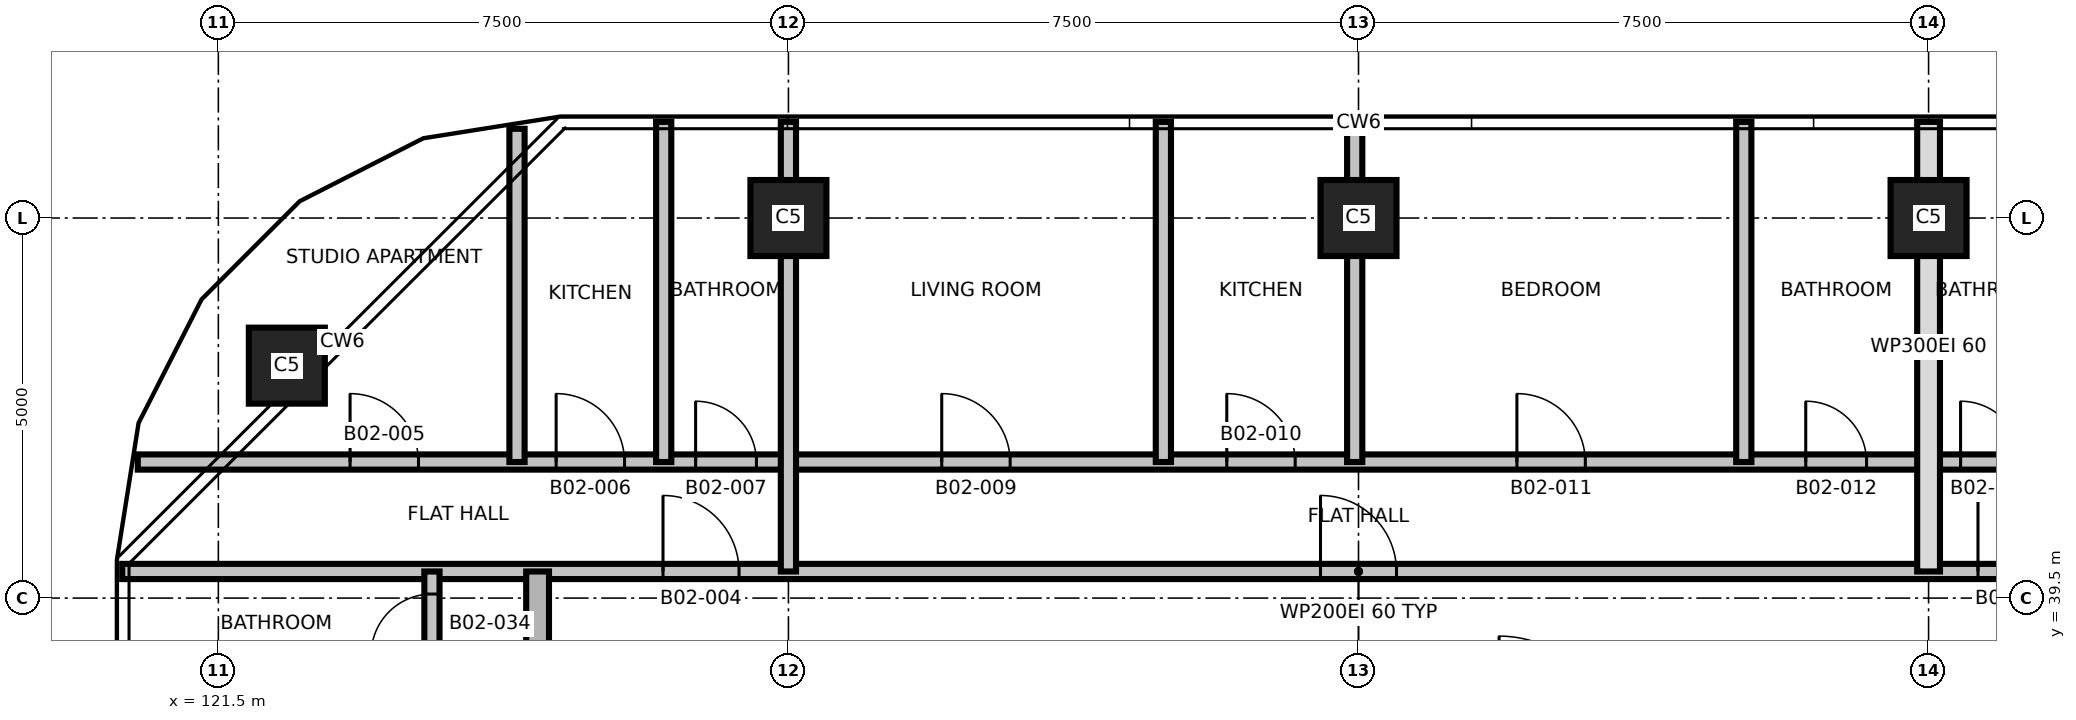
"""IFC4 building model, lengths in metres.
Left out: names, types, materials, properties, quantities, classifications, styles, units other than length and angle.
Written with IfcOpenShell. Run it as: python <this file> out.ifc"""

import sys

from ifc_helpers import new_model, si_unit, direction, frame, frame_2d, origin, origin_2d, place, context, subcontext, project, spatial, rectangle, extrude, element, fill, save


model = new_model("IFC4")
c1 = context("Model", 3, precision=1e-05, world=origin(), true_north=direction((0.0, 1.0)))
c2 = subcontext(c1, "Body", "Model", "MODEL_VIEW")
j1 = project(units=[si_unit("LENGTHUNIT", "METRE"), si_unit("PLANEANGLEUNIT", "RADIAN")], contexts=[c1])
p1 = place(None, origin())
s1 = spatial("IfcSite", under=j1, at=p1, CompositionType="ELEMENT")
p2 = place(p1, origin())
s2 = spatial("IfcBuilding", under=s1, at=p2, CompositionType="ELEMENT")
p3 = place(p2, frame((0.0, 0.0, 44.6)))
s3 = spatial("IfcBuildingStorey", under=s2, at=p3, CompositionType="ELEMENT", Elevation=44.6)
for number, where, z_axis, x_axis in (
    (1, (122.401, 42.558, 0.0), (0.0, 0.0, 1.0), (1.0, 0.0, 0.0)),
    (2, (129.0, 44.5, 0.0), (0.0, 0.0, 1.0), (1.0, 0.0, 0.0)),
    (3, (136.5, 44.5, 0.0), (0.0, 0.0, 1.0), (1.0, 0.0, 0.0)),
    (4, (144.0, 44.5, 0.0), (0.0, 0.0, 1.0), (1.0, 0.0, 0.0)),
):
    element("IfcColumn", number, at=place(p3, frame(where, z_axis=z_axis, x_axis=x_axis)), inside=s3, PredefinedType="COLUMN", context=c2, shape_type="SweptSolid", body=[
        extrude(rectangle(XDim=1.0, YDim=1.0, at=origin_2d()), origin(), (0.0, 0.0, 1.0), 3.7),
    ])
p4 = place(p3, frame((120.235, 39.85, 0.0), z_axis=(0.0, 0.0, 1.0), x_axis=(1.0, 0.0, 0.0)))
e5 = element("IfcWall", 5, at=p4, inside=s3, PredefinedType="PARTITIONING", context=c2, shape_type="SweptSolid", body=[
    extrude(rectangle(XDim=32.53, YDim=0.2, at=frame_2d((16.265, 0.0))), origin(), (0.0, 0.0, 1.0), 3.4),
])
p5 = place(p4, frame((7.115, 0.0, 0.0)))
e6 = element("IfcOpeningElement", 6, at=p5, cuts=e5, PredefinedType="OPENING", context=c2, shape_type="SweptSolid", body=[
    extrude(rectangle(XDim=1.0, YDim=2.1, at=frame_2d((0.5, 1.05))), frame((0.0, 0.11, 0.0), z_axis=(0.0, -1.0, 0.0), x_axis=(1.0, 0.0, 0.0)), (0.0, 0.0, 1.0), 0.22),
])
p6 = place(p4, frame((15.765, 0.0, 0.0)))
e7 = element("IfcOpeningElement", 7, at=p6, cuts=e5, PredefinedType="OPENING", context=c2, shape_type="SweptSolid", body=[
    extrude(rectangle(XDim=1.0, YDim=2.1, at=frame_2d((0.5, 1.05))), frame((0.0, 0.11, 0.0), z_axis=(0.0, -1.0, 0.0), x_axis=(1.0, 0.0, 0.0)), (0.0, 0.0, 1.0), 0.22),
])
p7 = place(p4, frame((24.415, 0.0, 0.0)))
e8 = element("IfcOpeningElement", 8, at=p7, cuts=e5, PredefinedType="OPENING", context=c2, shape_type="SweptSolid", body=[
    extrude(rectangle(XDim=1.0, YDim=2.1, at=frame_2d((0.5, 1.05))), frame((0.0, 0.11, 0.0), z_axis=(0.0, -1.0, 0.0), x_axis=(1.0, 0.0, 0.0)), (0.0, 0.0, 1.0), 0.22),
])
p8 = place(p3, frame((120.44, 41.29, 0.0), z_axis=(0.0, 0.0, 1.0), x_axis=(1.0, 0.0, 0.0)))
e9 = element("IfcWall", 9, at=p8, inside=s3, PredefinedType="PARTITIONING", context=c2, shape_type="SweptSolid", body=[
    extrude(rectangle(XDim=32.12, YDim=0.2, at=frame_2d((16.06, 0.0))), origin(), (0.0, 0.0, 1.0), 3.4),
])
p9 = place(p8, frame((2.793, 0.0, 0.0)))
e10 = element("IfcOpeningElement", 10, at=p9, cuts=e9, PredefinedType="OPENING", context=c2, shape_type="SweptSolid", body=[
    extrude(rectangle(XDim=0.9, YDim=2.1, at=frame_2d((0.45, 1.05))), frame((0.0, 0.11, 0.0), z_axis=(0.0, -1.0, 0.0), x_axis=(1.0, 0.0, 0.0)), (0.0, 0.0, 1.0), 0.22),
])
p10 = place(p8, frame((5.504, 0.0, 0.0)))
e11 = element("IfcOpeningElement", 11, at=p10, cuts=e9, PredefinedType="OPENING", context=c2, shape_type="SweptSolid", body=[
    extrude(rectangle(XDim=0.9, YDim=2.1, at=frame_2d((0.45, 1.05))), frame((0.0, 0.11, 0.0), z_axis=(0.0, -1.0, 0.0), x_axis=(1.0, 0.0, 0.0)), (0.0, 0.0, 1.0), 0.22),
])
p11 = place(p8, frame((7.339, 0.0, 0.0)))
e12 = element("IfcOpeningElement", 12, at=p11, cuts=e9, PredefinedType="OPENING", context=c2, shape_type="SweptSolid", body=[
    extrude(rectangle(XDim=0.8, YDim=2.1, at=frame_2d((0.4, 1.05))), frame((0.0, 0.11, 0.0), z_axis=(0.0, -1.0, 0.0), x_axis=(1.0, 0.0, 0.0)), (0.0, 0.0, 1.0), 0.22),
])
p12 = place(p8, frame((10.577, 0.0, 0.0)))
e13 = element("IfcOpeningElement", 13, at=p12, cuts=e9, PredefinedType="OPENING", context=c2, shape_type="SweptSolid", body=[
    extrude(rectangle(XDim=0.9, YDim=2.1, at=frame_2d((0.45, 1.05))), frame((0.0, 0.11, 0.0), z_axis=(0.0, -1.0, 0.0), x_axis=(1.0, 0.0, 0.0)), (0.0, 0.0, 1.0), 0.22),
])
p13 = place(p8, frame((14.327, 0.0, 0.0)))
e14 = element("IfcOpeningElement", 14, at=p13, cuts=e9, PredefinedType="OPENING", context=c2, shape_type="SweptSolid", body=[
    extrude(rectangle(XDim=0.9, YDim=2.1, at=frame_2d((0.45, 1.05))), frame((0.0, 0.11, 0.0), z_axis=(0.0, -1.0, 0.0), x_axis=(1.0, 0.0, 0.0)), (0.0, 0.0, 1.0), 0.22),
])
p14 = place(p8, frame((18.144, 0.0, 0.0)))
e15 = element("IfcOpeningElement", 15, at=p14, cuts=e9, PredefinedType="OPENING", context=c2, shape_type="SweptSolid", body=[
    extrude(rectangle(XDim=0.9, YDim=2.1, at=frame_2d((0.45, 1.05))), frame((0.0, 0.11, 0.0), z_axis=(0.0, -1.0, 0.0), x_axis=(1.0, 0.0, 0.0)), (0.0, 0.0, 1.0), 0.22),
])
p15 = place(p8, frame((21.944, 0.0, 0.0)))
e16 = element("IfcOpeningElement", 16, at=p15, cuts=e9, PredefinedType="OPENING", context=c2, shape_type="SweptSolid", body=[
    extrude(rectangle(XDim=0.8, YDim=2.1, at=frame_2d((0.4, 1.05))), frame((0.0, 0.11, 0.0), z_axis=(0.0, -1.0, 0.0), x_axis=(1.0, 0.0, 0.0)), (0.0, 0.0, 1.0), 0.22),
])
p16 = place(p8, frame((23.981, 0.0, 0.0)))
e17 = element("IfcOpeningElement", 17, at=p16, cuts=e9, PredefinedType="OPENING", context=c2, shape_type="SweptSolid", body=[
    extrude(rectangle(XDim=0.8, YDim=2.1, at=frame_2d((0.4, 1.05))), frame((0.0, 0.11, 0.0), z_axis=(0.0, -1.0, 0.0), x_axis=(1.0, 0.0, 0.0)), (0.0, 0.0, 1.0), 0.22),
])
p17 = place(p8, frame((25.716, 0.0, 0.0)))
e18 = element("IfcOpeningElement", 18, at=p17, cuts=e9, PredefinedType="OPENING", context=c2, shape_type="SweptSolid", body=[
    extrude(rectangle(XDim=0.9, YDim=2.1, at=frame_2d((0.45, 1.05))), frame((0.0, 0.11, 0.0), z_axis=(0.0, -1.0, 0.0), x_axis=(1.0, 0.0, 0.0)), (0.0, 0.0, 1.0), 0.22),
])
p18 = place(p8, frame((28.427, 0.0, 0.0)))
e19 = element("IfcOpeningElement", 19, at=p18, cuts=e9, PredefinedType="OPENING", context=c2, shape_type="SweptSolid", body=[
    extrude(rectangle(XDim=0.9, YDim=2.1, at=frame_2d((0.45, 1.05))), frame((0.0, 0.11, 0.0), z_axis=(0.0, -1.0, 0.0), x_axis=(1.0, 0.0, 0.0)), (0.0, 0.0, 1.0), 0.22),
])
p19 = place(p3, frame((124.31, 22.15, 0.0), z_axis=(0.0, 0.0, 1.0), x_axis=(0.0, 1.0, 0.0)))
e20 = element("IfcWall", 20, at=p19, inside=s3, PredefinedType="PARTITIONING", context=c2, shape_type="SweptSolid", body=[
    extrude(rectangle(XDim=17.7, YDim=0.2, at=frame_2d((8.85, 0.0))), origin(), (0.0, 0.0, 1.0), 3.4),
])
p20 = place(p19, frame((1.725, 0.0, 0.0)))
e21 = element("IfcOpeningElement", 21, at=p20, cuts=e20, PredefinedType="OPENING", context=c2, shape_type="SweptSolid", body=[
    extrude(rectangle(XDim=0.9, YDim=2.1, at=frame_2d((0.45, 1.05))), frame((0.0, 0.11, 0.0), z_axis=(0.0, -1.0, 0.0), x_axis=(1.0, 0.0, 0.0)), (0.0, 0.0, 1.0), 0.22),
])
p21 = place(p19, frame((6.195, 0.0, 0.0)))
e22 = element("IfcOpeningElement", 22, at=p21, cuts=e20, PredefinedType="OPENING", context=c2, shape_type="SweptSolid", body=[
    extrude(rectangle(XDim=0.9, YDim=2.1, at=frame_2d((0.45, 1.05))), frame((0.0, 0.11, 0.0), z_axis=(0.0, -1.0, 0.0), x_axis=(1.0, 0.0, 0.0)), (0.0, 0.0, 1.0), 0.22),
])
p22 = place(p19, frame((9.641, 0.0, 0.0)))
e23 = element("IfcOpeningElement", 23, at=p22, cuts=e20, PredefinedType="OPENING", context=c2, shape_type="SweptSolid", body=[
    extrude(rectangle(XDim=0.9, YDim=2.1, at=frame_2d((0.45, 1.05))), frame((0.0, 0.11, 0.0), z_axis=(0.0, -1.0, 0.0), x_axis=(1.0, 0.0, 0.0)), (0.0, 0.0, 1.0), 0.22),
])
p23 = place(p19, frame((11.895, 0.0, 0.0)))
e24 = element("IfcOpeningElement", 24, at=p23, cuts=e20, PredefinedType="OPENING", context=c2, shape_type="SweptSolid", body=[
    extrude(rectangle(XDim=0.8, YDim=2.1, at=frame_2d((0.4, 1.05))), frame((0.0, 0.11, 0.0), z_axis=(0.0, -1.0, 0.0), x_axis=(1.0, 0.0, 0.0)), (0.0, 0.0, 1.0), 0.22),
])
p24 = place(p19, frame((14.378, 0.0, 0.0)))
e25 = element("IfcOpeningElement", 25, at=p24, cuts=e20, PredefinedType="OPENING", context=c2, shape_type="SweptSolid", body=[
    extrude(rectangle(XDim=0.9, YDim=2.1, at=frame_2d((0.45, 1.05))), frame((0.0, 0.11, 0.0), z_axis=(0.0, -1.0, 0.0), x_axis=(1.0, 0.0, 0.0)), (0.0, 0.0, 1.0), 0.22),
])
p25 = place(p19, frame((16.603, 0.0, 0.0)))
e26 = element("IfcOpeningElement", 26, at=p25, cuts=e20, PredefinedType="OPENING", context=c2, shape_type="SweptSolid", body=[
    extrude(rectangle(XDim=0.8, YDim=2.1, at=frame_2d((0.4, 1.05))), frame((0.0, 0.11, 0.0), z_axis=(0.0, -1.0, 0.0), x_axis=(1.0, 0.0, 0.0)), (0.0, 0.0, 1.0), 0.22),
])
p26 = place(p3, frame((125.429, 41.29, 0.0), z_axis=(0.0, 0.0, 1.0), x_axis=(0.0, 1.0, 0.0)))
e27 = element("IfcWall", 27, at=p26, inside=s3, PredefinedType="PARTITIONING", context=c2, shape_type="SweptSolid", body=[
    extrude(rectangle(XDim=4.384, YDim=0.2, at=frame_2d((2.192, 0.0))), origin(), (0.0, 0.0, 1.0), 3.4),
])
p27 = place(p3, frame((125.7, 22.15, 0.0), z_axis=(0.0, 0.0, 1.0), x_axis=(0.0, 1.0, 0.0)))
e28 = element("IfcWall", 28, at=p27, inside=s3, PredefinedType="SHEAR", context=c2, shape_type="SweptSolid", body=[
    extrude(rectangle(XDim=17.7, YDim=0.3, at=frame_2d((8.85, 0.0))), origin(), (0.0, 0.0, 1.0), 3.4),
])
p28 = place(p27, frame((2.7, 0.0, 0.0)))
e29 = element("IfcOpeningElement", 29, at=p28, cuts=e28, PredefinedType="OPENING", context=c2, shape_type="SweptSolid", body=[
    extrude(rectangle(XDim=1.0, YDim=2.1, at=frame_2d((0.5, 1.05))), frame((0.0, 0.16, 0.0), z_axis=(0.0, -1.0, 0.0), x_axis=(1.0, 0.0, 0.0)), (0.0, 0.0, 1.0), 0.32),
])
p29 = place(p3, frame((127.359, 41.29, 0.0), z_axis=(0.0, 0.0, 1.0), x_axis=(0.0, 1.0, 0.0)))
e30 = element("IfcWall", 30, at=p29, inside=s3, PredefinedType="PARTITIONING", context=c2, shape_type="SweptSolid", body=[
    extrude(rectangle(XDim=4.475, YDim=0.2, at=frame_2d((2.237, 0.0))), origin(), (0.0, 0.0, 1.0), 3.4),
])
p30 = place(p3, frame((129.0, 39.85, 0.0), z_axis=(0.0, 0.0, 1.0), x_axis=(0.0, 1.0, 0.0)))
e31 = element("IfcWall", 31, at=p30, inside=s3, PredefinedType="PARTITIONING", context=c2, shape_type="SweptSolid", body=[
    extrude(rectangle(XDim=5.915, YDim=0.2, at=frame_2d((2.958, 0.0))), origin(), (0.0, 0.0, 1.0), 3.4),
])
for number, where, z_axis, x_axis in (
    (32, (133.933, 41.29, 0.0), (0.0, 0.0, 1.0), (0.0, 1.0, 0.0)),
    (33, (136.45, 41.29, 0.0), (0.0, 0.0, 1.0), (0.0, 1.0, 0.0)),
    (34, (141.569, 41.29, 0.0), (0.0, 0.0, 1.0), (0.0, 1.0, 0.0)),
):
    element("IfcWall", number, at=place(p3, frame(where, z_axis=z_axis, x_axis=x_axis)), inside=s3, PredefinedType="PARTITIONING", context=c2, shape_type="SweptSolid", body=[
        extrude(rectangle(XDim=4.475, YDim=0.2, at=frame_2d((2.237, 0.0))), origin(), (0.0, 0.0, 1.0), 3.4),
    ])
p31 = place(p3, frame((144.0, 39.85, 0.0), z_axis=(0.0, 0.0, 1.0), x_axis=(0.0, 1.0, 0.0)))
e35 = element("IfcWall", 35, at=p31, inside=s3, PredefinedType="PARTITIONING", context=c2, shape_type="SweptSolid", body=[
    extrude(rectangle(XDim=5.915, YDim=0.3, at=frame_2d((2.958, 0.0))), origin(), (0.0, 0.0, 1.0), 3.4),
])
p32 = place(p5, origin())
e36 = element("IfcDoor", 36, at=p32, inside=s3, OperationType="SINGLE_SWING_RIGHT", PredefinedType="DOOR", context=c2, shape_type="SweptSolid", body=[
    extrude(rectangle(XDim=1.0, YDim=2.1, at=frame_2d((0.5, 1.05))), frame((0.0, 0.025, 0.0), z_axis=(0.0, -1.0, 0.0), x_axis=(1.0, 0.0, 0.0)), (0.0, 0.0, 1.0), 0.05),
])
fill(e6, e36)
p33 = place(p9, origin())
e37 = element("IfcDoor", 37, at=p33, inside=s3, OperationType="SINGLE_SWING_LEFT", PredefinedType="DOOR", context=c2, shape_type="SweptSolid", body=[
    extrude(rectangle(XDim=0.9, YDim=2.1, at=frame_2d((0.45, 1.05))), frame((0.0, 0.025, 0.0), z_axis=(0.0, -1.0, 0.0), x_axis=(1.0, 0.0, 0.0)), (0.0, 0.0, 1.0), 0.05),
])
fill(e10, e37)
p34 = place(p10, origin())
e38 = element("IfcDoor", 38, at=p34, inside=s3, OperationType="SINGLE_SWING_RIGHT", PredefinedType="DOOR", context=c2, shape_type="SweptSolid", body=[
    extrude(rectangle(XDim=0.9, YDim=2.1, at=frame_2d((0.45, 1.05))), frame((0.0, 0.025, 0.0), z_axis=(0.0, -1.0, 0.0), x_axis=(1.0, 0.0, 0.0)), (0.0, 0.0, 1.0), 0.05),
])
fill(e11, e38)
p35 = place(p11, origin())
e39 = element("IfcDoor", 39, at=p35, inside=s3, OperationType="SINGLE_SWING_LEFT", PredefinedType="DOOR", context=c2, shape_type="SweptSolid", body=[
    extrude(rectangle(XDim=0.8, YDim=2.1, at=frame_2d((0.4, 1.05))), frame((0.0, 0.025, 0.0), z_axis=(0.0, -1.0, 0.0), x_axis=(1.0, 0.0, 0.0)), (0.0, 0.0, 1.0), 0.05),
])
fill(e12, e39)
p36 = place(p6, origin())
e40 = element("IfcDoor", 40, at=p36, inside=s3, OperationType="SINGLE_SWING_RIGHT", PredefinedType="DOOR", context=c2, shape_type="SweptSolid", body=[
    extrude(rectangle(XDim=1.0, YDim=2.1, at=frame_2d((0.5, 1.05))), frame((0.0, 0.025, 0.0), z_axis=(0.0, -1.0, 0.0), x_axis=(1.0, 0.0, 0.0)), (0.0, 0.0, 1.0), 0.05),
])
fill(e7, e40)
p37 = place(p12, origin())
e41 = element("IfcDoor", 41, at=p37, inside=s3, OperationType="SINGLE_SWING_LEFT", PredefinedType="DOOR", context=c2, shape_type="SweptSolid", body=[
    extrude(rectangle(XDim=0.9, YDim=2.1, at=frame_2d((0.45, 1.05))), frame((0.0, 0.025, 0.0), z_axis=(0.0, -1.0, 0.0), x_axis=(1.0, 0.0, 0.0)), (0.0, 0.0, 1.0), 0.05),
])
fill(e13, e41)
p38 = place(p13, origin())
e42 = element("IfcDoor", 42, at=p38, inside=s3, OperationType="SINGLE_SWING_RIGHT", PredefinedType="DOOR", context=c2, shape_type="SweptSolid", body=[
    extrude(rectangle(XDim=0.9, YDim=2.1, at=frame_2d((0.45, 1.05))), frame((0.0, 0.025, 0.0), z_axis=(0.0, -1.0, 0.0), x_axis=(1.0, 0.0, 0.0)), (0.0, 0.0, 1.0), 0.05),
])
fill(e14, e42)
p39 = place(p14, origin())
e43 = element("IfcDoor", 43, at=p39, inside=s3, OperationType="SINGLE_SWING_LEFT", PredefinedType="DOOR", context=c2, shape_type="SweptSolid", body=[
    extrude(rectangle(XDim=0.9, YDim=2.1, at=frame_2d((0.45, 1.05))), frame((0.0, 0.025, 0.0), z_axis=(0.0, -1.0, 0.0), x_axis=(1.0, 0.0, 0.0)), (0.0, 0.0, 1.0), 0.05),
])
fill(e15, e43)
p40 = place(p15, origin())
e44 = element("IfcDoor", 44, at=p40, inside=s3, OperationType="SINGLE_SWING_RIGHT", PredefinedType="DOOR", context=c2, shape_type="SweptSolid", body=[
    extrude(rectangle(XDim=0.8, YDim=2.1, at=frame_2d((0.4, 1.05))), frame((0.0, 0.025, 0.0), z_axis=(0.0, -1.0, 0.0), x_axis=(1.0, 0.0, 0.0)), (0.0, 0.0, 1.0), 0.05),
])
fill(e16, e44)
p41 = place(p7, origin())
e45 = element("IfcDoor", 45, at=p41, inside=s3, OperationType="SINGLE_SWING_LEFT", PredefinedType="DOOR", context=c2, shape_type="SweptSolid", body=[
    extrude(rectangle(XDim=1.0, YDim=2.1, at=frame_2d((0.5, 1.05))), frame((0.0, 0.025, 0.0), z_axis=(0.0, -1.0, 0.0), x_axis=(1.0, 0.0, 0.0)), (0.0, 0.0, 1.0), 0.05),
])
fill(e8, e45)
p42 = place(p16, origin())
e46 = element("IfcDoor", 46, at=p42, inside=s3, OperationType="SINGLE_SWING_RIGHT", PredefinedType="DOOR", context=c2, shape_type="SweptSolid", body=[
    extrude(rectangle(XDim=0.8, YDim=2.1, at=frame_2d((0.4, 1.05))), frame((0.0, 0.025, 0.0), z_axis=(0.0, -1.0, 0.0), x_axis=(1.0, 0.0, 0.0)), (0.0, 0.0, 1.0), 0.05),
])
fill(e17, e46)
p43 = place(p25, origin())
e47 = element("IfcDoor", 47, at=p43, inside=s3, OperationType="SINGLE_SWING_RIGHT", PredefinedType="DOOR", context=c2, shape_type="SweptSolid", body=[
    extrude(rectangle(XDim=0.8, YDim=2.1, at=frame_2d((0.4, 1.05))), frame((0.0, 0.025, 0.0), z_axis=(0.0, -1.0, 0.0), x_axis=(1.0, 0.0, 0.0)), (0.0, 0.0, 1.0), 0.05),
])
fill(e26, e47)
save(model, sys.argv[1])
